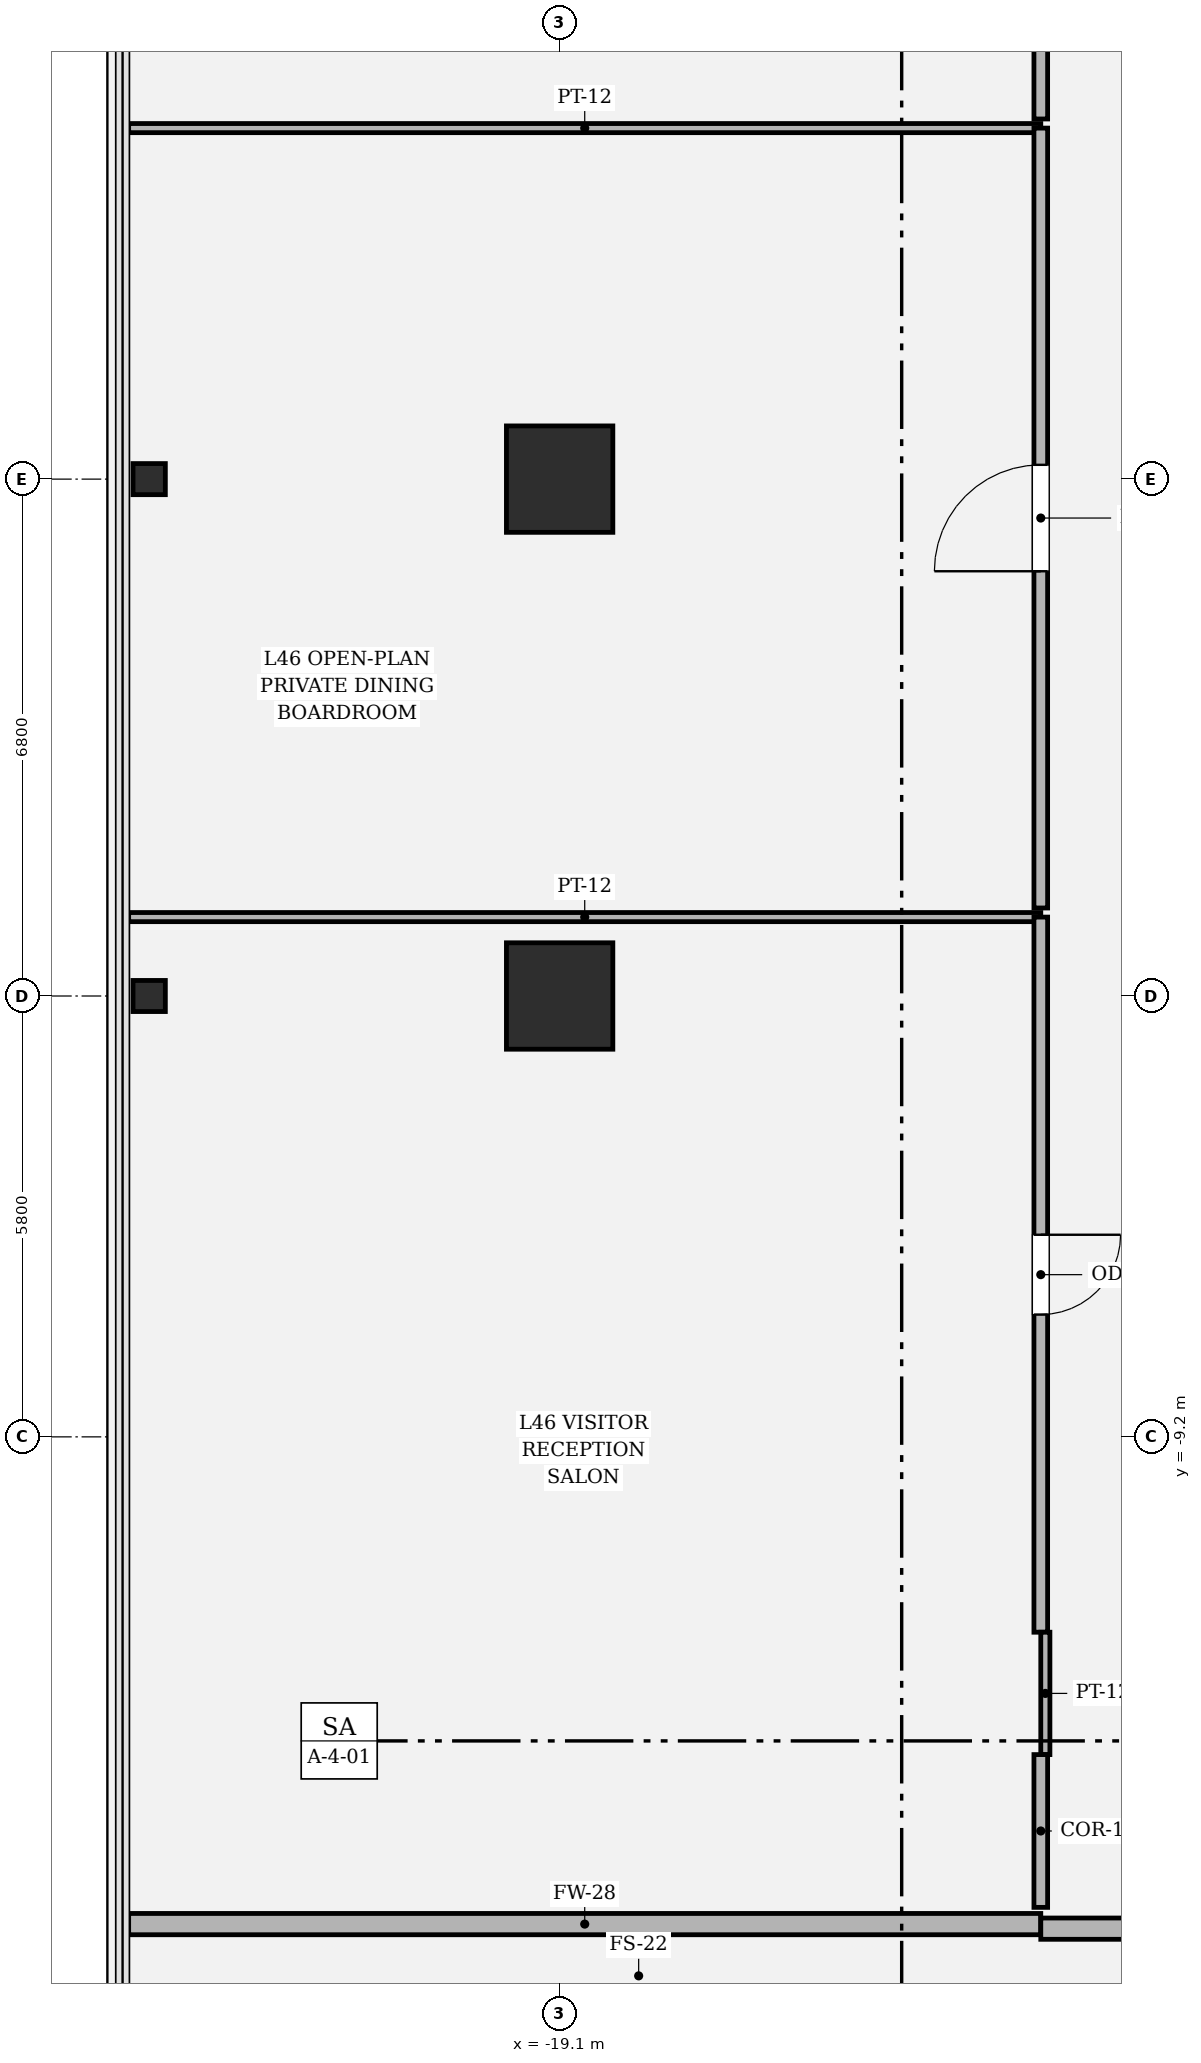
"""IFC4 building model, lengths in metres.
Left out: names, types, materials, properties, quantities, classifications, styles, units other than length and angle.
Written with IfcOpenShell. Run it as: python <this file> out.ifc"""

import sys

from ifc_helpers import new_model, si_unit, direction, frame, frame_2d, origin, origin_2d, place, context, subcontext, project, spatial, rectangle, hollow_rectangle, i_section, extrude, element, fill, save


model = new_model("IFC4")
c1 = context("Model", 3, precision=1e-05, world=origin(), true_north=direction((0.0, 1.0)))
c2 = subcontext(c1, "Body", "Model", "MODEL_VIEW")
j1 = project(units=[si_unit("LENGTHUNIT", "METRE"), si_unit("PLANEANGLEUNIT", "RADIAN")], contexts=[c1])
p1 = place(None, origin())
s1 = spatial("IfcSite", under=j1, at=p1, CompositionType="ELEMENT")
p2 = place(p1, origin())
s2 = spatial("IfcBuilding", under=s1, at=p2, CompositionType="ELEMENT")
p3 = place(p2, frame((0.0, 0.0, 196.5)))
s3 = spatial("IfcBuildingStorey", under=s2, at=p3, CompositionType="ELEMENT", Elevation=196.5)
for number, where, z_axis, x_axis in (
    (1, (-19.1, 3.4, 0.0), (0.0, 0.0, 1.0), (1.0, 0.0, 0.0)),
    (2, (-19.1, -3.4, 0.0), (0.0, 0.0, 1.0), (1.0, 0.0, 0.0)),
):
    element("IfcColumn", number, at=place(p3, frame(where, z_axis=z_axis, x_axis=x_axis)), inside=s3, PredefinedType="COLUMN", context=c2, shape_type="SweptSolid", body=[
        extrude(hollow_rectangle(XDim=1.4, YDim=1.4, WallThickness=0.042, at=origin_2d()), origin(), (0.0, 0.0, 1.0), 4.05),
    ])
for number, where, z_axis, x_axis in (
    (3, (-24.5, -3.4, 0.0), (0.0, 0.0, 1.0), (0.0, 1.0, 0.0)),
    (4, (-24.5, 3.4, 0.0), (0.0, 0.0, 1.0), (0.0, 1.0, 0.0)),
):
    element("IfcColumn", number, at=place(p3, frame(where, z_axis=z_axis, x_axis=x_axis)), inside=s3, PredefinedType="COLUMN", context=c2, shape_type="SweptSolid", body=[
        extrude(i_section(OverallWidth=0.409, OverallDepth=0.425, WebThickness=0.032, FlangeThickness=0.052, FilletRadius=0.018, at=origin_2d()), origin(), (0.0, 0.0, 1.0), 4.048),
    ])
p4 = place(p3, frame((-24.77, -15.61, 0.0), z_axis=(0.0, 0.0, 1.0), x_axis=(1.0, 0.0, 0.0)))
e5 = element("IfcWall", 5, at=p4, inside=s3, PredefinedType="SOLIDWALL", context=c2, shape_type="SweptSolid", body=[
    extrude(rectangle(XDim=12.0, YDim=0.28, at=frame_2d((6.0, 0.0))), origin(), (0.0, 0.0, 1.0), 2.544),
])
p5 = place(p3, frame((-12.77, -15.67, 0.0), z_axis=(0.0, 0.0, 1.0), x_axis=(1.0, 0.0, 0.0)))
e6 = element("IfcWall", 6, at=p5, inside=s3, PredefinedType="SOLIDWALL", context=c2, shape_type="SweptSolid", body=[
    extrude(rectangle(XDim=11.57, YDim=0.28, at=frame_2d((5.785, 0.0))), origin(), (0.0, 0.0, 1.0), 3.174),
])
p6 = place(p5, frame((4.935, 0.0, 0.0)))
e7 = element("IfcOpeningElement", 7, at=p6, cuts=e6, PredefinedType="OPENING", context=c2, shape_type="SweptSolid", body=[
    extrude(rectangle(XDim=1.7, YDim=2.3, at=frame_2d((0.85, 1.15))), frame((0.0, 0.15, 0.0), z_axis=(0.0, -1.0, 0.0), x_axis=(1.0, 0.0, 0.0)), (0.0, 0.0, 1.0), 0.3),
])
p7 = place(p3, frame((-24.77, -2.362, 0.0), z_axis=(0.0, 0.0, 1.0), x_axis=(1.0, 0.0, 0.0)))
e8 = element("IfcWall", 8, at=p7, inside=s3, PredefinedType="PARTITIONING", context=c2, shape_type="SweptSolid", body=[
    extrude(rectangle(XDim=12.0, YDim=0.12, at=frame_2d((6.0, 0.0))), origin(), (0.0, 0.0, 1.0), 2.544),
])
p8 = place(p3, frame((-12.77, -2.362, 0.0), z_axis=(0.0, 0.0, 1.0), x_axis=(0.0, -1.0, 0.0)))
e9 = element("IfcWall", 9, at=p8, inside=s3, PredefinedType="PARTITIONING", context=c2, shape_type="SweptSolid", body=[
    extrude(rectangle(XDim=9.408, YDim=0.18, at=frame_2d((4.704, 0.0))), origin(), (0.0, 0.0, 1.0), 3.174),
])
p9 = place(p8, frame((4.179, 0.0, 0.0)))
e10 = element("IfcOpeningElement", 10, at=p9, cuts=e9, PredefinedType="OPENING", context=c2, shape_type="SweptSolid", body=[
    extrude(rectangle(XDim=1.05, YDim=2.2, at=frame_2d((0.525, 1.1))), frame((0.0, 0.1, 0.0), z_axis=(0.0, -1.0, 0.0), x_axis=(1.0, 0.0, 0.0)), (0.0, 0.0, 1.0), 0.2),
])
p10 = place(p3, frame((-12.71, -11.77, 0.0), z_axis=(0.0, 0.0, 1.0), x_axis=(0.0, -1.0, 0.0)))
e11 = element("IfcWall", 11, at=p10, inside=s3, PredefinedType="PARTITIONING", context=c2, shape_type="SweptSolid", body=[
    extrude(rectangle(XDim=1.61, YDim=0.12, at=frame_2d((0.805, 0.0))), origin(), (0.0, 0.0, 1.0), 3.424),
])
p11 = place(p3, frame((-12.77, -13.38, 0.0), z_axis=(0.0, 0.0, 1.0), x_axis=(0.0, -1.0, 0.0)))
e12 = element("IfcWall", 12, at=p11, inside=s3, PredefinedType="PARTITIONING", context=c2, shape_type="SweptSolid", body=[
    extrude(rectangle(XDim=2.01, YDim=0.18, at=frame_2d((1.005, 0.0))), origin(), (0.0, 0.0, 1.0), 3.424),
])
p12 = place(p3, frame((-24.77, 8.018, 0.0), z_axis=(0.0, 0.0, 1.0), x_axis=(1.0, 0.0, 0.0)))
e13 = element("IfcWall", 13, at=p12, inside=s3, PredefinedType="PARTITIONING", context=c2, shape_type="SweptSolid", body=[
    extrude(rectangle(XDim=12.0, YDim=0.12, at=frame_2d((6.0, 0.0))), origin(), (0.0, 0.0, 1.0), 2.544),
])
p13 = place(p3, frame((-12.77, 8.018, 0.0), z_axis=(0.0, 0.0, 1.0), x_axis=(0.0, -1.0, 0.0)))
e14 = element("IfcWall", 14, at=p13, inside=s3, PredefinedType="PARTITIONING", context=c2, shape_type="SweptSolid", body=[
    extrude(rectangle(XDim=10.26, YDim=0.18, at=frame_2d((5.13, 0.0))), origin(), (0.0, 0.0, 1.0), 3.174),
])
p14 = place(p13, frame((4.43, 0.0, 0.0)))
e15 = element("IfcOpeningElement", 15, at=p14, cuts=e14, PredefinedType="OPENING", context=c2, shape_type="SweptSolid", body=[
    extrude(rectangle(XDim=1.4, YDim=2.25, at=frame_2d((0.7, 1.125))), frame((0.0, 0.1, 0.0), z_axis=(0.0, -1.0, 0.0), x_axis=(1.0, 0.0, 0.0)), (0.0, 0.0, 1.0), 0.2),
])
p15 = place(p3, frame((-12.77, 18.37, 0.0), z_axis=(0.0, 0.0, 1.0), x_axis=(0.0, -1.0, 0.0)))
e16 = element("IfcWall", 16, at=p15, inside=s3, PredefinedType="PARTITIONING", context=c2, shape_type="SweptSolid", body=[
    extrude(rectangle(XDim=10.232, YDim=0.18, at=frame_2d((5.116, 0.0))), origin(), (0.0, 0.0, 1.0), 3.174),
])
p16 = place(p15, frame((4.591, 0.0, 0.0)))
e17 = element("IfcOpeningElement", 17, at=p16, cuts=e16, PredefinedType="OPENING", context=c2, shape_type="SweptSolid", body=[
    extrude(rectangle(XDim=1.05, YDim=2.2, at=frame_2d((0.525, 1.1))), frame((0.0, 0.1, 0.0), z_axis=(0.0, -1.0, 0.0), x_axis=(1.0, 0.0, 0.0)), (0.0, 0.0, 1.0), 0.2),
])
p17 = place(p9, origin())
e18 = element("IfcDoor", 18, at=p17, inside=s3, OperationType="SINGLE_SWING_LEFT", PredefinedType="DOOR", context=c2, shape_type="SweptSolid", body=[
    extrude(rectangle(XDim=1.05, YDim=2.2, at=frame_2d((0.525, 1.1))), frame((0.0, 0.025, 0.0), z_axis=(0.0, -1.0, 0.0), x_axis=(1.0, 0.0, 0.0)), (0.0, 0.0, 1.0), 0.05),
])
fill(e10, e18)
p18 = place(p14, origin())
e19 = element("IfcDoor", 19, at=p18, inside=s3, OperationType="SINGLE_SWING_RIGHT", PredefinedType="DOOR", context=c2, shape_type="SweptSolid", body=[
    extrude(rectangle(XDim=1.4, YDim=2.25, at=frame_2d((0.7, 1.125))), frame((0.0, 0.025, 0.0), z_axis=(0.0, -1.0, 0.0), x_axis=(1.0, 0.0, 0.0)), (0.0, 0.0, 1.0), 0.05),
])
fill(e15, e19)
save(model, sys.argv[1])
